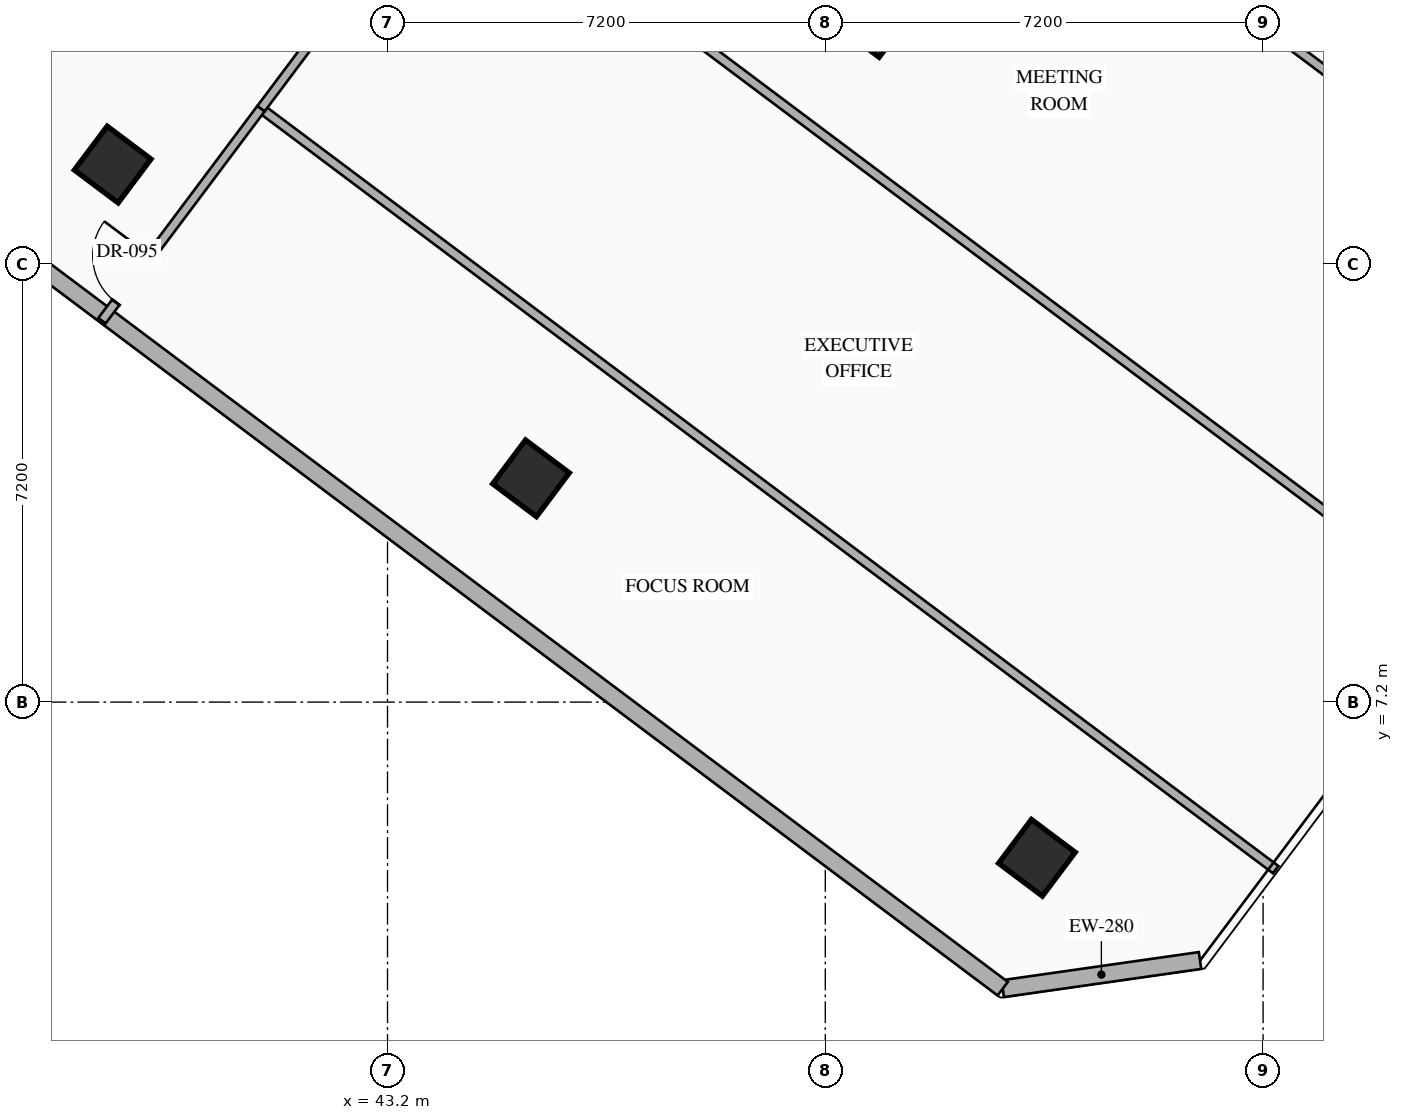
"""IFC4 building model, lengths in metres.
Left out: names, types, materials, properties, quantities, classifications, styles, units other than length and angle.
Written with IfcOpenShell. Run it as: python <this file> out.ifc"""

import sys

from ifc_helpers import new_model, si_unit, direction, frame, frame_2d, origin, origin_2d, place, context, subcontext, project, spatial, rectangle, hollow_rectangle, extrude, element, fill, save


model = new_model("IFC4")
c1 = context("Model", 3, precision=1e-05, world=origin(), true_north=direction((0.0, 1.0)))
c2 = subcontext(c1, "Body", "Model", "MODEL_VIEW")
j1 = project(units=[si_unit("LENGTHUNIT", "METRE"), si_unit("PLANEANGLEUNIT", "RADIAN")], contexts=[c1])
p1 = place(None, origin())
s1 = spatial("IfcSite", under=j1, at=p1, CompositionType="ELEMENT")
p2 = place(p1, origin())
s2 = spatial("IfcBuilding", under=s1, at=p2, CompositionType="ELEMENT")
p3 = place(p2, frame((0.0, 0.0, 122.85)))
s3 = spatial("IfcBuildingStorey", under=s2, at=p3, CompositionType="ELEMENT", Elevation=122.85)
for number, where, z_axis, x_axis in (
    (1, (38.68, 16.04, 0.0), (0.0, 0.0, 1.0), (0.8, -0.6, 0.0)),
    (2, (45.56, 10.88, 0.0), (0.0, 0.0, 1.0), (0.8, -0.6, 0.0)),
):
    element("IfcColumn", number, at=place(p3, frame(where, z_axis=z_axis, x_axis=x_axis)), inside=s3, PredefinedType="COLUMN", context=c2, shape_type="SweptSolid", body=[
        extrude(hollow_rectangle(XDim=0.9, YDim=0.9, WallThickness=0.036, at=origin_2d()), origin(), (0.0, 0.0, 1.0), 3.6),
    ])
p4 = place(p3, frame((51.2, 18.4, 0.0), z_axis=(0.0, 0.0, 1.0), x_axis=(0.799999996291, -0.600000004945, 0.0)))
e3 = element("IfcColumn", 3, at=p4, inside=s3, PredefinedType="COLUMN", context=c2, shape_type="SweptSolid", body=[
    extrude(hollow_rectangle(XDim=0.85, YDim=0.85, WallThickness=0.032, at=origin_2d()), origin(), (0.0, 0.0, 1.0), 3.6),
])
p5 = place(p3, frame((53.88, 4.64, 0.0), z_axis=(0.0, 0.0, 1.0), x_axis=(0.799999996291, -0.600000004945, 0.0)))
e4 = element("IfcColumn", 4, at=p5, inside=s3, PredefinedType="COLUMN", context=c2, shape_type="SweptSolid", body=[
    extrude(hollow_rectangle(XDim=0.9, YDim=0.9, WallThickness=0.036, at=origin_2d()), origin(), (0.0, 0.0, 1.0), 3.6),
])
p6 = place(p3, frame((56.563, 2.95, 0.0), z_axis=(0.0, 0.0, 1.0), x_axis=(-0.989977778067, -0.141223223777, 0.0)))
e5 = element("IfcWall", 5, at=p6, inside=s3, PredefinedType="STANDARD", context=c2, shape_type="SweptSolid", body=[
    extrude(rectangle(XDim=3.278, YDim=0.28, at=frame_2d((1.639, 0.0))), origin(), (0.0, 0.0, 1.0), 3.35),
])
p7 = place(p3, frame((53.318, 2.487, 0.0), z_axis=(0.0, 0.0, 1.0), x_axis=(-0.800004174678, 0.599994433723, 0.0)))
e6 = element("IfcWall", 6, at=p7, inside=s3, PredefinedType="STANDARD", context=c2, shape_type="SweptSolid", body=[
    extrude(rectangle(XDim=35.089, YDim=0.28, at=frame_2d((17.544, 0.0))), origin(), (0.0, 0.0, 1.0), 3.35),
])
p8 = place(p3, frame((41.12, 16.96, 0.0), z_axis=(0.0, 0.0, 1.0), x_axis=(0.800002808908, -0.599996254772, 0.0)))
e7 = element("IfcWall", 7, at=p8, inside=s3, PredefinedType="PARTITIONING", context=c2, shape_type="SweptSolid", body=[
    extrude(rectangle(XDim=20.86, YDim=0.15, at=frame_2d((10.43, 0.0))), origin(), (0.0, 0.0, 1.0), 3.35),
])
p9 = place(p3, frame((38.504, 13.472, 0.0), z_axis=(0.0, 0.0, 1.0), x_axis=(0.600026876565, 0.799979841871, 0.0)))
e8 = element("IfcWall", 8, at=p9, inside=s3, PredefinedType="PARTITIONING", context=c2, shape_type="SweptSolid", body=[
    extrude(rectangle(XDim=4.36, YDim=0.15, at=frame_2d((2.18, 0.0))), origin(), (0.0, 0.0, 1.0), 3.35),
])
p10 = place(p9, frame((0.38, 0.0, 0.0)))
e9 = element("IfcOpeningElement", 9, at=p10, cuts=e8, PredefinedType="OPENING", context=c2, shape_type="SweptSolid", body=[
    extrude(rectangle(XDim=0.95, YDim=2.15, at=frame_2d((0.475, 1.075))), frame((0.0, 0.085, 0.0), z_axis=(0.0, -1.0, 0.0), x_axis=(1.0, 0.0, 0.0)), (0.0, 0.0, 1.0), 0.17),
])
p11 = place(p3, frame((44.24, 21.12, 0.0), z_axis=(0.0, 0.0, 1.0), x_axis=(0.799997191095, -0.600003745189, 0.0)))
e10 = element("IfcWall", 10, at=p11, inside=s3, PredefinedType="PARTITIONING", context=c2, shape_type="SweptSolid", body=[
    extrude(rectangle(XDim=20.86, YDim=0.15, at=frame_2d((10.43, 0.0))), origin(), (0.0, 0.0, 1.0), 2.995),
])
p12 = place(p3, frame((41.12, 16.96, 0.0), z_axis=(0.0, 0.0, 1.0), x_axis=(0.599969951782, 0.800022535282, 0.0)))
e11 = element("IfcWall", 11, at=p12, inside=s3, PredefinedType="PARTITIONING", context=c2, shape_type="SweptSolid", body=[
    extrude(rectangle(XDim=5.2, YDim=0.15, at=frame_2d((2.6, 0.0))), origin(), (0.0, 0.0, 1.0), 3.35),
])
p13 = place(p12, frame((2.125, 0.0, 0.0)))
e12 = element("IfcOpeningElement", 12, at=p13, cuts=e11, PredefinedType="OPENING", context=c2, shape_type="SweptSolid", body=[
    extrude(rectangle(XDim=0.95, YDim=2.15, at=frame_2d((0.475, 1.075))), frame((0.0, 0.085, 0.0), z_axis=(0.0, -1.0, 0.0), x_axis=(1.0, 0.0, 0.0)), (0.0, 0.0, 1.0), 0.17),
])
for number, where, z_axis, x_axis in (
    (13, (47.72, 25.76, 0.0), (0.0, 0.0, 1.0), (0.8, -0.6, 0.0)),
    (14, (50.96, 30.08, 0.0), (0.0, 0.0, 1.0), (0.8, -0.6, 0.0)),
):
    element("IfcWall", number, at=place(p3, frame(where, z_axis=z_axis, x_axis=x_axis)), inside=s3, PredefinedType="PARTITIONING", context=c2, shape_type="SweptSolid", body=[
        extrude(rectangle(XDim=20.86, YDim=0.15, at=frame_2d((10.43, 0.0))), origin(), (0.0, 0.0, 1.0), 3.35),
    ])
p14 = place(p10, origin())
e15 = element("IfcDoor", 15, at=p14, inside=s3, OperationType="SINGLE_SWING_RIGHT", PredefinedType="DOOR", context=c2, shape_type="SweptSolid", body=[
    extrude(rectangle(XDim=0.95, YDim=2.15, at=frame_2d((0.475, 1.075))), frame((0.0, 0.025, 0.0), z_axis=(0.0, -1.0, 0.0), x_axis=(1.0, 0.0, 0.0)), (0.0, 0.0, 1.0), 0.05),
])
fill(e9, e15)
save(model, sys.argv[1])
